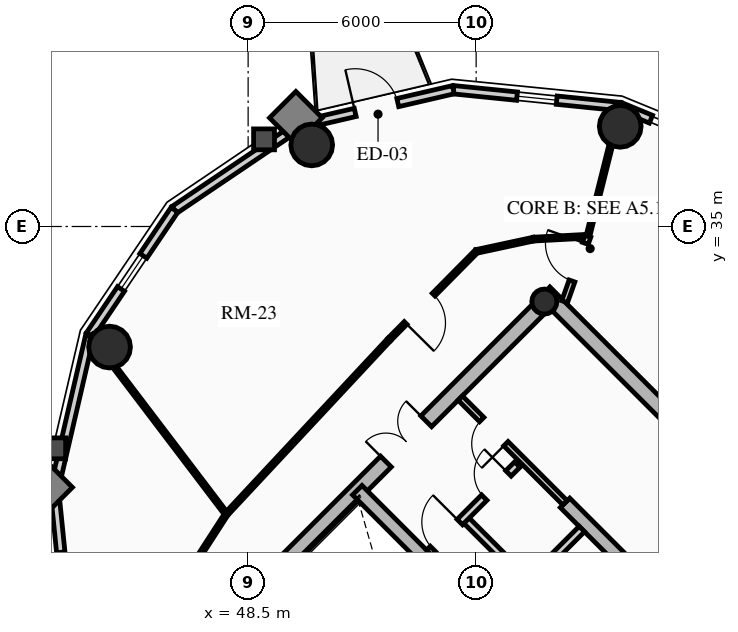
"""IFC4 building model, lengths in metres.
Left out: names, types, materials, properties, quantities, classifications, styles, units other than length and angle.
Written with IfcOpenShell. Run it as: python <this file> out.ifc"""

import sys

from ifc_helpers import new_model, si_unit, direction, frame, frame_2d, origin, origin_2d, place, context, subcontext, project, spatial, rectangle, circle, hollow_circle, extrude, source, transform, mapped, element, fill, save


model = new_model("IFC4")
c1 = context("Model", 3, precision=1e-05, world=origin(), true_north=direction((0.0, 1.0)))
c2 = subcontext(c1, "Body", "Model", "MODEL_VIEW")
j1 = project(units=[si_unit("LENGTHUNIT", "METRE"), si_unit("PLANEANGLEUNIT", "RADIAN")], contexts=[c1])
p1 = place(None, origin())
s1 = spatial("IfcSite", under=j1, at=p1, CompositionType="ELEMENT")
p2 = place(p1, origin())
s2 = spatial("IfcBuilding", under=s1, at=p2, CompositionType="ELEMENT")
p3 = place(p2, frame((0.0, 0.0, 196.66)))
s3 = spatial("IfcBuildingStorey", under=s2, at=p3, CompositionType="ELEMENT", Elevation=196.66)
p4 = place(p3, frame((66.268, 23.298, 0.0), z_axis=(0.0, 0.0, 1.0), x_axis=(-0.707106781187, 0.707106781187, 0.0)))
e1 = element("IfcWall", 1, at=p4, inside=s3, PredefinedType="SHEAR", context=c2, shape_type="SweptSolid", body=[
    extrude(rectangle(XDim=14.1, YDim=0.4, at=frame_2d((7.05, 0.0))), origin(), (0.0, 0.0, 1.0), 2.91),
])
p5 = place(p3, frame((48.873, 25.561, 0.0), z_axis=(0.0, 0.0, 1.0), x_axis=(0.707106781187, 0.707106781187, 0.0)))
e2 = element("IfcWall", 2, at=p5, inside=s3, PredefinedType="SHEAR", context=c2, shape_type="SweptSolid", body=[
    extrude(rectangle(XDim=10.7, YDim=0.4, at=frame_2d((5.35, 0.0))), origin(), (0.0, 0.0, 1.0), 2.91),
])
m1 = source(origin(), c2, "Body", "SweptSolid", [
    extrude(rectangle(XDim=1.5, YDim=2.02, at=frame_2d((0.75, 1.01))), frame((0.0, 0.21, 0.0), z_axis=(0.0, -1.0, 0.0), x_axis=(1.0, 0.0, 0.0)), (0.0, 0.0, 1.0), 0.42),
])
p6 = place(p5, frame((4.6, 0.0, 0.0)))
e3 = element("IfcOpeningElement", 3, at=p6, cuts=e2, PredefinedType="OPENING", context=c2, shape_type="MappedRepresentation", body=[
    mapped(m1, transform((0.0, 0.0, 0.0), x_axis=(1.0, 0.0, 0.0), y_axis=(0.0, 1.0, 0.0), z_axis=(0.0, 0.0, 1.0), scale=1.0)),
])
p7 = place(p3, frame((61.06, 18.373, 0.0), z_axis=(0.0, 0.0, 1.0), x_axis=(-0.707106781187, 0.707106781187, 0.0)))
e4 = element("IfcWall", 4, at=p7, inside=s3, PredefinedType="SHEAR", context=c2, shape_type="SweptSolid", body=[
    extrude(rectangle(XDim=13.7, YDim=0.35, at=frame_2d((6.85, 0.0))), origin(), (0.0, 0.0, 1.0), 2.91),
])
m2 = source(origin(), c2, "Body", "SweptSolid", [
    extrude(rectangle(XDim=1.1, YDim=2.015, at=frame_2d((0.55, 1.007))), frame((0.0, 0.185, 0.0), z_axis=(0.0, -1.0, 0.0), x_axis=(1.0, 0.0, 0.0)), (0.0, 0.0, 1.0), 0.37),
])
p8 = place(p7, frame((4.85, 0.0, 0.0)))
e5 = element("IfcOpeningElement", 5, at=p8, cuts=e4, PredefinedType="OPENING", context=c2, shape_type="MappedRepresentation", body=[
    mapped(m2, transform((0.0, 0.0, 0.0), x_axis=(1.0, 0.0, 0.0), y_axis=(0.0, 1.0, 0.0), z_axis=(0.0, 0.0, 1.0), scale=1.0)),
])
p9 = place(p7, frame((0.625, 0.0, 0.0)))
e6 = element("IfcOpeningElement", 6, at=p9, cuts=e4, PredefinedType="OPENING", context=c2, shape_type="MappedRepresentation", body=[
    mapped(m2, transform((0.0, 0.0, 0.0), x_axis=(1.0, 0.0, 0.0), y_axis=(0.0, 1.0, 0.0), z_axis=(0.0, 0.0, 1.0), scale=1.0)),
])
p10 = place(p7, frame((2.625, 0.0, 0.0)))
e7 = element("IfcOpeningElement", 7, at=p10, cuts=e4, PredefinedType="OPENING", context=c2, shape_type="MappedRepresentation", body=[
    mapped(m2, transform((0.0, 0.0, 0.0), x_axis=(1.0, 0.0, 0.0), y_axis=(0.0, 1.0, 0.0), z_axis=(0.0, 0.0, 1.0), scale=1.0)),
])
m3 = source(origin(), c2, "Body", "SweptSolid", [
    extrude(rectangle(XDim=1.15, YDim=2.02, at=frame_2d((0.575, 1.01))), frame((0.0, 0.185, 0.0), z_axis=(0.0, -1.0, 0.0), x_axis=(1.0, 0.0, 0.0)), (0.0, 0.0, 1.0), 0.37),
])
p11 = place(p7, frame((7.27, 0.0, 0.0)))
e8 = element("IfcOpeningElement", 8, at=p11, cuts=e4, PredefinedType="OPENING", context=c2, shape_type="MappedRepresentation", body=[
    mapped(m3, transform((0.0, 0.0, 0.0), x_axis=(1.0, 0.0, 0.0), y_axis=(0.0, 1.0, 0.0), z_axis=(0.0, 0.0, 1.0), scale=1.0)),
])
p12 = place(p3, frame((63.627, 20.94, 0.0), z_axis=(0.0, 0.0, 1.0), x_axis=(-0.707119496762, 0.707094065383, 0.0)))
e9 = element("IfcWall", 9, at=p12, inside=s3, PredefinedType="SHEAR", context=c2, shape_type="SweptSolid", body=[
    extrude(rectangle(XDim=9.6, YDim=0.35, at=frame_2d((4.8, 0.0))), origin(), (0.0, 0.0, 1.0), 2.91),
])
p13 = place(p12, frame((5.28, 0.0, 0.0)))
e10 = element("IfcOpeningElement", 10, at=p13, cuts=e9, PredefinedType="OPENING", context=c2, shape_type="MappedRepresentation", body=[
    mapped(m3, transform((0.0, 0.0, 0.0), x_axis=(1.0, 0.0, 0.0), y_axis=(0.0, 1.0, 0.0), z_axis=(0.0, 0.0, 1.0), scale=1.0)),
])
p14 = place(p3, frame((58.893, 25.674, 0.0), z_axis=(0.0, 0.0, 1.0), x_axis=(0.707106781187, 0.707106781187, 0.0)))
e11 = element("IfcWall", 11, at=p14, inside=s3, PredefinedType="SHEAR", context=c2, shape_type="SweptSolid", body=[
    extrude(rectangle(XDim=3.285, YDim=0.35, at=frame_2d((1.643, 0.0))), origin(), (0.0, 0.0, 1.0), 2.91),
])
p15 = place(p3, frame((56.294, 33.024, 0.0), z_axis=(0.0, 0.0, 1.0), x_axis=(0.707106781187, 0.707106781187, 0.0)))
e12 = element("IfcColumn", 12, at=p15, inside=s3, PredefinedType="COLUMN", context=c2, shape_type="SweptSolid", body=[
    extrude(hollow_circle(Radius=0.33, WallThickness=0.025, at=origin_2d()), origin(), (0.0, 0.0, 1.0), 2.91),
])
for number, where, z_axis, x_axis in (
    (13, (58.291, 37.635, 0.0), (0.0, 0.0, 1.0), (1.0, 0.0, 0.0)),
    (14, (50.173, 37.146, 0.0), (0.0, 0.0, 1.0), (1.0, 0.0, 0.0)),
    (15, (44.854, 31.827, 0.0), (0.0, 0.0, 1.0), (1.0, 0.0, 0.0)),
):
    element("IfcColumn", number, at=place(p3, frame(where, z_axis=z_axis, x_axis=x_axis)), inside=s3, PredefinedType="USERDEFINED", context=c2, shape_type="SweptSolid", body=[
        extrude(circle(Radius=0.55, at=origin_2d()), origin(), (0.0, 0.0, 1.0), 2.91),
    ])
p16 = place(p3, frame((58.295, 38.155, 0.0), z_axis=(0.0, 0.0, 1.0), x_axis=(0.924515260676, -0.381145028536, 0.0)))
e16 = element("IfcWall", 16, at=p16, inside=s3, PredefinedType="SOLIDWALL", context=c2, shape_type="SweptSolid", body=[
    extrude(rectangle(XDim=0.87, YDim=0.22, at=frame_2d((0.435, 0.0))), origin(), (0.0, 0.0, 1.0), 2.322),
])
p17 = place(p3, frame((53.9, 38.599, 0.0), z_axis=(0.0, 0.0, 1.0), x_axis=(0.994929930991, -0.100570534541, 0.0)))
e17 = element("IfcWall", 17, at=p17, inside=s3, PredefinedType="SOLIDWALL", context=c2, shape_type="SweptSolid", body=[
    extrude(rectangle(XDim=4.418, YDim=0.22, at=frame_2d((2.209, 0.0))), origin(), (0.0, 0.0, 1.0), 2.322),
])
m4 = source(origin(), c2, "Body", "SweptSolid", [
    extrude(rectangle(XDim=1.05, YDim=1.3, at=frame_2d((0.525, 0.65))), frame((0.0, 0.12, 0.0), z_axis=(0.0, -1.0, 0.0), x_axis=(1.0, 0.0, 0.0)), (0.0, 0.0, 1.0), 0.24),
])
p18 = place(p17, frame((1.684, 0.0, 0.65)))
e18 = element("IfcOpeningElement", 18, at=p18, cuts=e17, PredefinedType="OPENING", context=c2, shape_type="MappedRepresentation", body=[
    mapped(m4, transform((0.0, 0.0, 0.0), x_axis=(1.0, 0.0, 0.0), y_axis=(0.0, 1.0, 0.0), z_axis=(0.0, 0.0, 1.0), scale=1.0)),
])
p19 = place(p3, frame((49.856, 37.663, 0.0), z_axis=(0.0, 0.0, 1.0), x_axis=(0.974249228678, 0.225473813158, 0.0)))
e19 = element("IfcWall", 19, at=p19, inside=s3, PredefinedType="SOLIDWALL", context=c2, shape_type="SweptSolid", body=[
    extrude(rectangle(XDim=4.15, YDim=0.22, at=frame_2d((2.075, 0.0))), origin(), (0.0, 0.0, 1.0), 2.322),
])
m5 = source(origin(), c2, "Body", "SweptSolid", [
    extrude(rectangle(XDim=1.15, YDim=2.005, at=frame_2d((0.575, 1.002))), frame((0.0, 0.12, 0.0), z_axis=(0.0, -1.0, 0.0), x_axis=(1.0, 0.0, 0.0)), (0.0, 0.0, 1.0), 0.24),
])
p20 = place(p19, frame((1.5, 0.0, 0.0)))
e20 = element("IfcOpeningElement", 20, at=p20, cuts=e19, PredefinedType="OPENING", context=c2, shape_type="MappedRepresentation", body=[
    mapped(m5, transform((0.0, 0.0, 0.0), x_axis=(1.0, 0.0, 0.0), y_axis=(0.0, 1.0, 0.0), z_axis=(0.0, 0.0, 1.0), scale=1.0)),
])
p21 = place(p3, frame((46.561, 35.439, 0.0), z_axis=(0.0, 0.0, 1.0), x_axis=(0.828833723692, 0.559495003079, 0.0)))
e21 = element("IfcWall", 21, at=p21, inside=s3, PredefinedType="SOLIDWALL", context=c2, shape_type="SweptSolid", body=[
    extrude(rectangle(XDim=3.976, YDim=0.22, at=frame_2d((1.988, 0.0))), origin(), (0.0, 0.0, 1.0), 2.322),
])
p22 = place(p3, frame((44.337, 32.144, 0.0), z_axis=(0.0, 0.0, 1.0), x_axis=(0.559495003079, 0.828833723692, 0.0)))
e22 = element("IfcWall", 22, at=p22, inside=s3, PredefinedType="SOLIDWALL", context=c2, shape_type="SweptSolid", body=[
    extrude(rectangle(XDim=3.976, YDim=0.22, at=frame_2d((1.988, 0.0))), origin(), (0.0, 0.0, 1.0), 2.322),
])
p23 = place(p22, frame((1.463, 0.0, 0.65)))
e23 = element("IfcOpeningElement", 23, at=p23, cuts=e22, PredefinedType="OPENING", context=c2, shape_type="MappedRepresentation", body=[
    mapped(m4, transform((0.0, 0.0, 0.0), x_axis=(1.0, 0.0, 0.0), y_axis=(0.0, 1.0, 0.0), z_axis=(0.0, 0.0, 1.0), scale=1.0)),
])
p24 = place(p3, frame((43.401, 28.1, 0.0), z_axis=(0.0, 0.0, 1.0), x_axis=(0.225473813158, 0.974249228678, 0.0)))
e24 = element("IfcWall", 24, at=p24, inside=s3, PredefinedType="SOLIDWALL", context=c2, shape_type="SweptSolid", body=[
    extrude(rectangle(XDim=4.15, YDim=0.22, at=frame_2d((2.075, 0.0))), origin(), (0.0, 0.0, 1.0), 2.322),
])
p25 = place(p3, frame((43.845, 23.705, 0.0), z_axis=(0.0, 0.0, 1.0), x_axis=(-0.100570534541, 0.994929930991, 0.0)))
e25 = element("IfcWall", 25, at=p25, inside=s3, PredefinedType="SOLIDWALL", context=c2, shape_type="SweptSolid", body=[
    extrude(rectangle(XDim=4.418, YDim=0.22, at=frame_2d((2.209, 0.0))), origin(), (0.0, 0.0, 1.0), 2.322),
])
p26 = place(p25, frame((1.684, 0.0, 0.65)))
e26 = element("IfcOpeningElement", 26, at=p26, cuts=e25, PredefinedType="OPENING", context=c2, shape_type="MappedRepresentation", body=[
    mapped(m4, transform((0.0, 0.0, 0.0), x_axis=(1.0, 0.0, 0.0), y_axis=(0.0, 1.0, 0.0), z_axis=(0.0, 0.0, 1.0), scale=1.0)),
])
p27 = place(p3, frame((54.961, 24.719, 0.0), z_axis=(0.0, 0.0, 1.0), x_axis=(0.707106781187, 0.707106781187, 0.0)))
e27 = element("IfcWall", 27, at=p27, inside=s3, PredefinedType="PARTITIONING", context=c2, shape_type="SweptSolid", body=[
    extrude(rectangle(XDim=3.28, YDim=0.2, at=frame_2d((1.64, 0.0))), origin(), (0.0, 0.0, 1.0), 2.685),
])
m6 = source(origin(), c2, "Body", "SweptSolid", [
    extrude(rectangle(XDim=0.9, YDim=2.005, at=frame_2d((0.45, 1.002))), frame((0.0, 0.11, 0.0), z_axis=(0.0, -1.0, 0.0), x_axis=(1.0, 0.0, 0.0)), (0.0, 0.0, 1.0), 0.22),
])
p28 = place(p27, frame((0.16, 0.0, 0.0)))
e28 = element("IfcOpeningElement", 28, at=p28, cuts=e27, PredefinedType="OPENING", context=c2, shape_type="MappedRepresentation", body=[
    mapped(m6, transform((0.0, 0.0, 0.0), x_axis=(1.0, 0.0, 0.0), y_axis=(0.0, 1.0, 0.0), z_axis=(0.0, 0.0, 1.0), scale=1.0)),
])
p29 = place(p3, frame((55.874, 25.631, 0.0), z_axis=(0.0, 0.0, 1.0), x_axis=(-0.707157639372, 0.707055919343, 0.0)))
e29 = element("IfcWall", 29, at=p29, inside=s3, PredefinedType="PARTITIONING", context=c2, shape_type="SweptSolid", body=[
    extrude(rectangle(XDim=2.4, YDim=0.2, at=frame_2d((1.2, 0.0))), origin(), (0.0, 0.0, 1.0), 2.685),
])
p30 = place(p3, frame((53.264, 26.416, 0.0), z_axis=(0.0, 0.0, 1.0), x_axis=(0.707106781187, 0.707106781187, 0.0)))
e30 = element("IfcWall", 30, at=p30, inside=s3, PredefinedType="PARTITIONING", context=c2, shape_type="SweptSolid", body=[
    extrude(rectangle(XDim=3.28, YDim=0.2, at=frame_2d((1.64, 0.0))), origin(), (0.0, 0.0, 1.0), 2.685),
])
m7 = source(origin(), c2, "Body", "SweptSolid", [
    extrude(rectangle(XDim=1.0, YDim=2.015, at=frame_2d((0.5, 1.007))), frame((0.0, 0.11, 0.0), z_axis=(0.0, -1.0, 0.0), x_axis=(1.0, 0.0, 0.0)), (0.0, 0.0, 1.0), 0.22),
])
p31 = place(p30, frame((0.14, 0.0, 0.0)))
e31 = element("IfcOpeningElement", 31, at=p31, cuts=e30, PredefinedType="OPENING", context=c2, shape_type="MappedRepresentation", body=[
    mapped(m7, transform((0.0, 0.0, 0.0), x_axis=(1.0, 0.0, 0.0), y_axis=(0.0, 1.0, 0.0), z_axis=(0.0, 0.0, 1.0), scale=1.0)),
])
p32 = place(p30, frame((2.05, 0.0, 0.0)))
e32 = element("IfcOpeningElement", 32, at=p32, cuts=e30, PredefinedType="OPENING", context=c2, shape_type="MappedRepresentation", body=[
    mapped(m6, transform((0.0, 0.0, 0.0), x_axis=(1.0, 0.0, 0.0), y_axis=(0.0, 1.0, 0.0), z_axis=(0.0, 0.0, 1.0), scale=1.0)),
])
p33 = place(p3, frame((56.839, 27.728, 0.0), z_axis=(0.0, 0.0, 1.0), x_axis=(-0.707106781187, 0.707106781187, 0.0)))
e33 = element("IfcWall", 33, at=p33, inside=s3, PredefinedType="PARTITIONING", context=c2, shape_type="SweptSolid", body=[
    extrude(rectangle(XDim=3.9, YDim=0.16, at=frame_2d((1.95, 0.0))), origin(), (0.0, 0.0, 1.0), 2.685),
])
m8 = source(origin(), c2, "Body", "SweptSolid", [
    extrude(rectangle(XDim=0.9, YDim=2.005, at=frame_2d((0.45, 1.002))), frame((0.0, 0.09, 0.0), z_axis=(0.0, -1.0, 0.0), x_axis=(1.0, 0.0, 0.0)), (0.0, 0.0, 1.0), 0.18),
])
p34 = place(p33, frame((2.2, 0.0, 0.0)))
e34 = element("IfcOpeningElement", 34, at=p34, cuts=e33, PredefinedType="OPENING", context=c2, shape_type="MappedRepresentation", body=[
    mapped(m8, transform((0.0, 0.0, 0.0), x_axis=(1.0, 0.0, 0.0), y_axis=(0.0, 1.0, 0.0), z_axis=(0.0, 0.0, 1.0), scale=1.0)),
])
p35 = place(p3, frame((57.44, 34.744, 0.0), z_axis=(0.0, 0.0, 1.0), x_axis=(-0.998578025565, -0.053309725738, 0.0)))
e35 = element("IfcWall", 35, at=p35, inside=s3, PredefinedType="MOVABLE", context=c2, shape_type="SweptSolid", body=[
    extrude(rectangle(XDim=1.433, YDim=0.1, at=frame_2d((0.717, 0.0))), origin(), (0.0, 0.0, 1.0), 2.322),
])
p36 = place(p3, frame((56.009, 34.667, 0.0), z_axis=(0.0, 0.0, 1.0), x_axis=(-0.977625498152, -0.210353001795, 0.0)))
e36 = element("IfcWall", 36, at=p36, inside=s3, PredefinedType="MOVABLE", context=c2, shape_type="SweptSolid", body=[
    extrude(rectangle(XDim=1.538, YDim=0.1, at=frame_2d((0.769, 0.0))), origin(), (0.0, 0.0, 1.0), 2.255),
])
p37 = place(p3, frame((54.506, 34.344, 0.0), z_axis=(0.0, 0.0, 1.0), x_axis=(-0.703053402247, -0.711137056824, 0.0)))
e37 = element("IfcWall", 37, at=p37, inside=s3, PredefinedType="MOVABLE", context=c2, shape_type="SweptSolid", body=[
    extrude(rectangle(XDim=3.262, YDim=0.1, at=frame_2d((1.631, 0.0))), origin(), (0.0, 0.0, 1.0), 2.322),
])
m9 = source(origin(), c2, "Body", "SweptSolid", [
    extrude(rectangle(XDim=1.05, YDim=2.015, at=frame_2d((0.525, 1.007))), frame((0.0, 0.06, 0.0), z_axis=(0.0, -1.0, 0.0), x_axis=(1.0, 0.0, 0.0)), (0.0, 0.0, 1.0), 0.12),
])
p38 = place(p37, frame((1.599, 0.0, 0.0)))
e38 = element("IfcOpeningElement", 38, at=p38, cuts=e37, PredefinedType="OPENING", context=c2, shape_type="MappedRepresentation", body=[
    mapped(m9, transform((0.0, 0.0, 0.0), x_axis=(1.0, 0.0, 0.0), y_axis=(0.0, 1.0, 0.0), z_axis=(0.0, 0.0, 1.0), scale=1.0)),
])
p39 = place(p3, frame((52.212, 32.024, 0.0), z_axis=(0.0, 0.0, 1.0), x_axis=(-0.682158998173, -0.731203871169, 0.0)))
e39 = element("IfcWall", 39, at=p39, inside=s3, PredefinedType="MOVABLE", context=c2, shape_type="SweptSolid", body=[
    extrude(rectangle(XDim=6.282, YDim=0.1, at=frame_2d((3.141, 0.0))), origin(), (0.0, 0.0, 1.0), 2.255),
])
p40 = place(p3, frame((47.927, 27.431, 0.0), z_axis=(0.0, 0.0, 1.0), x_axis=(-0.543126643356, -0.839650790077, 0.0)))
e40 = element("IfcWall", 40, at=p40, inside=s3, PredefinedType="MOVABLE", context=c2, shape_type="SweptSolid", body=[
    extrude(rectangle(XDim=1.868, YDim=0.1, at=frame_2d((0.934, 0.0))), origin(), (0.0, 0.0, 1.0), 2.255),
])
p41 = place(p3, frame((57.44, 34.744, 0.0), z_axis=(0.0, 0.0, 1.0), x_axis=(0.243619816457, 0.969870808422, 0.0)))
e41 = element("IfcWall", 41, at=p41, inside=s3, PredefinedType="MOVABLE", context=c2, shape_type="SweptSolid", body=[
    extrude(rectangle(XDim=3.496, YDim=0.1, at=frame_2d((1.748, 0.0))), origin(), (0.0, 0.0, 1.0), 2.322),
])
p42 = place(p3, frame((47.927, 27.431, 0.0), z_axis=(0.0, 0.0, 1.0), x_axis=(-0.604823333103, 0.796359677366, 0.0)))
e42 = element("IfcWall", 42, at=p42, inside=s3, PredefinedType="MOVABLE", context=c2, shape_type="SweptSolid", body=[
    extrude(rectangle(XDim=5.907, YDim=0.1, at=frame_2d((2.953, 0.0))), origin(), (0.0, 0.0, 1.0), 2.322),
])
p43 = place(p3, frame((56.828, 33.021, 0.0), z_axis=(0.0, 0.0, 1.0), x_axis=(0.334788446034, 0.942293317605, 0.0)))
e43 = element("IfcWall", 43, at=p43, inside=s3, PredefinedType="PARTITIONING", context=c2, shape_type="SweptSolid", body=[
    extrude(rectangle(XDim=1.829, YDim=0.16, at=frame_2d((0.915, 0.0))), origin(), (0.0, 0.0, 1.0), 2.255),
])
m10 = source(origin(), c2, "Body", "SweptSolid", [
    extrude(rectangle(XDim=1.05, YDim=2.015, at=frame_2d((0.525, 1.007))), frame((0.0, 0.09, 0.0), z_axis=(0.0, -1.0, 0.0), x_axis=(1.0, 0.0, 0.0)), (0.0, 0.0, 1.0), 0.18),
])
p44 = place(p43, frame((0.579, 0.0, 0.0)))
e44 = element("IfcOpeningElement", 44, at=p44, cuts=e43, PredefinedType="OPENING", context=c2, shape_type="MappedRepresentation", body=[
    mapped(m10, transform((0.0, 0.0, 0.0), x_axis=(1.0, 0.0, 0.0), y_axis=(0.0, 1.0, 0.0), z_axis=(0.0, 0.0, 1.0), scale=1.0)),
])
m11 = source(origin(), c2, "Body", "SweptSolid", [
    extrude(rectangle(XDim=1.05, YDim=1.3, at=frame_2d((0.525, 0.65))), frame((0.0, 0.03, 0.0), z_axis=(0.0, -1.0, 0.0), x_axis=(1.0, 0.0, 0.0)), (0.0, 0.0, 1.0), 0.06),
])
p45 = place(p18, origin())
e45 = element("IfcWindow", 45, at=p45, inside=s3, PartitioningType="SINGLE_PANEL", PredefinedType="WINDOW", context=c2, shape_type="MappedRepresentation", body=[
    mapped(m11, transform((0.0, 0.0, 0.0), x_axis=(1.0, 0.0, 0.0), y_axis=(0.0, 1.0, 0.0), z_axis=(0.0, 0.0, 1.0), scale=1.0)),
])
fill(e18, e45)
m12 = source(origin(), c2, "Body", "SweptSolid", [
    extrude(rectangle(XDim=1.15, YDim=2.005, at=frame_2d((0.575, 1.002))), frame((0.0, 0.025, 0.0), z_axis=(0.0, -1.0, 0.0), x_axis=(1.0, 0.0, 0.0)), (0.0, 0.0, 1.0), 0.05),
])
p46 = place(p20, origin())
e46 = element("IfcDoor", 46, at=p46, inside=s3, OperationType="SINGLE_SWING_LEFT", PredefinedType="DOOR", context=c2, shape_type="MappedRepresentation", body=[
    mapped(m12, transform((0.0, 0.0, 0.0), x_axis=(1.0, 0.0, 0.0), y_axis=(0.0, 1.0, 0.0), z_axis=(0.0, 0.0, 1.0), scale=1.0)),
])
fill(e20, e46)
p47 = place(p23, origin())
e47 = element("IfcWindow", 47, at=p47, inside=s3, PartitioningType="SINGLE_PANEL", PredefinedType="WINDOW", context=c2, shape_type="MappedRepresentation", body=[
    mapped(m11, transform((0.0, 0.0, 0.0), x_axis=(1.0, 0.0, 0.0), y_axis=(0.0, 1.0, 0.0), z_axis=(0.0, 0.0, 1.0), scale=1.0)),
])
fill(e23, e47)
m13 = source(origin(), c2, "Body", "SweptSolid", [
    extrude(rectangle(XDim=1.5, YDim=2.02, at=frame_2d((0.75, 1.01))), frame((0.0, 0.025, 0.0), z_axis=(0.0, -1.0, 0.0), x_axis=(1.0, 0.0, 0.0)), (0.0, 0.0, 1.0), 0.05),
])
p48 = place(p6, origin())
e48 = element("IfcDoor", 48, at=p48, inside=s3, OperationType="DOUBLE_DOOR_SINGLE_SWING", PredefinedType="DOOR", context=c2, shape_type="MappedRepresentation", body=[
    mapped(m13, transform((0.0, 0.0, 0.0), x_axis=(1.0, 0.0, 0.0), y_axis=(0.0, 1.0, 0.0), z_axis=(0.0, 0.0, 1.0), scale=1.0)),
])
fill(e3, e48)
m14 = source(origin(), c2, "Body", "SweptSolid", [
    extrude(rectangle(XDim=1.0, YDim=2.015, at=frame_2d((0.5, 1.007))), frame((0.0, 0.025, 0.0), z_axis=(0.0, -1.0, 0.0), x_axis=(1.0, 0.0, 0.0)), (0.0, 0.0, 1.0), 0.05),
])
p49 = place(p31, origin())
e49 = element("IfcDoor", 49, at=p49, inside=s3, OperationType="SINGLE_SWING_RIGHT", PredefinedType="DOOR", context=c2, shape_type="MappedRepresentation", body=[
    mapped(m14, transform((0.0, 0.0, 0.0), x_axis=(1.0, 0.0, 0.0), y_axis=(0.0, 1.0, 0.0), z_axis=(0.0, 0.0, 1.0), scale=1.0)),
])
fill(e31, e49)
m15 = source(origin(), c2, "Body", "SweptSolid", [
    extrude(rectangle(XDim=0.9, YDim=2.005, at=frame_2d((0.45, 1.002))), frame((0.0, 0.025, 0.0), z_axis=(0.0, -1.0, 0.0), x_axis=(1.0, 0.0, 0.0)), (0.0, 0.0, 1.0), 0.05),
])
p50 = place(p32, origin())
e50 = element("IfcDoor", 50, at=p50, inside=s3, OperationType="SINGLE_SWING_RIGHT", PredefinedType="DOOR", context=c2, shape_type="MappedRepresentation", body=[
    mapped(m15, transform((0.0, 0.0, 0.0), x_axis=(1.0, 0.0, 0.0), y_axis=(0.0, 1.0, 0.0), z_axis=(0.0, 0.0, 1.0), scale=1.0)),
])
fill(e32, e50)
p51 = place(p34, origin())
e51 = element("IfcDoor", 51, at=p51, inside=s3, OperationType="SINGLE_SWING_LEFT", PredefinedType="DOOR", context=c2, shape_type="MappedRepresentation", body=[
    mapped(m15, transform((0.0, 0.0, 0.0), x_axis=(1.0, 0.0, 0.0), y_axis=(0.0, 1.0, 0.0), z_axis=(0.0, 0.0, 1.0), scale=1.0)),
])
fill(e34, e51)
m16 = source(origin(), c2, "Body", "SweptSolid", [
    extrude(rectangle(XDim=1.05, YDim=2.015, at=frame_2d((0.525, 1.007))), frame((0.0, 0.025, 0.0), z_axis=(0.0, -1.0, 0.0), x_axis=(1.0, 0.0, 0.0)), (0.0, 0.0, 1.0), 0.05),
])
p52 = place(p44, origin())
e52 = element("IfcDoor", 52, at=p52, inside=s3, OperationType="SINGLE_SWING_RIGHT", PredefinedType="DOOR", context=c2, shape_type="MappedRepresentation", body=[
    mapped(m16, transform((0.0, 0.0, 0.0), x_axis=(1.0, 0.0, 0.0), y_axis=(0.0, 1.0, 0.0), z_axis=(0.0, 0.0, 1.0), scale=1.0)),
])
fill(e44, e52)
p53 = place(p38, origin())
e53 = element("IfcDoor", 53, at=p53, inside=s3, OperationType="SINGLE_SWING_RIGHT", PredefinedType="DOOR", context=c2, shape_type="MappedRepresentation", body=[
    mapped(m16, transform((0.0, 0.0, 0.0), x_axis=(1.0, 0.0, 0.0), y_axis=(0.0, 1.0, 0.0), z_axis=(0.0, 0.0, 1.0), scale=1.0)),
])
fill(e38, e53)
save(model, sys.argv[1])
